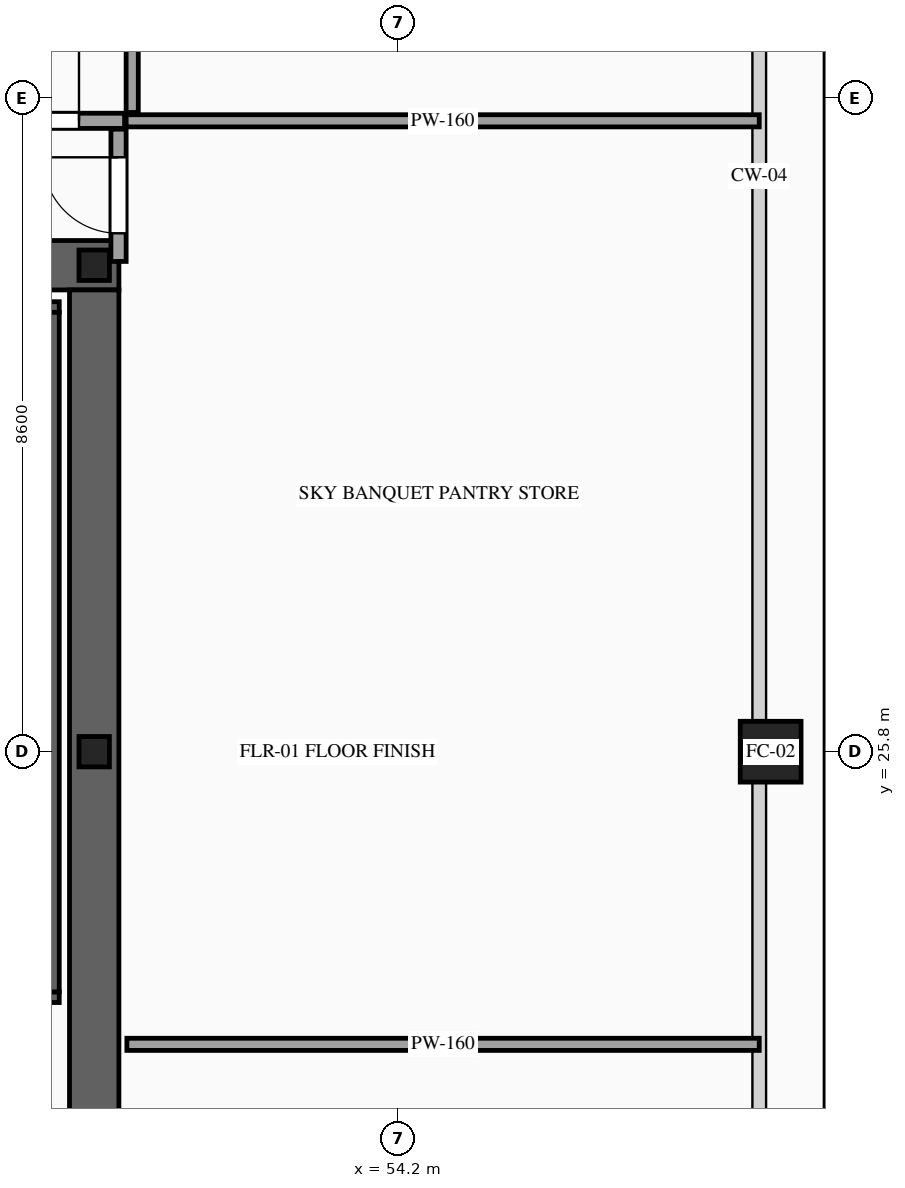
"""IFC4 building model, lengths in metres.
Left out: names, types, materials, properties, quantities, classifications, styles, units other than length and angle.
Written with IfcOpenShell. Run it as: python <this file> out.ifc"""

import sys

from ifc_helpers import new_model, si_unit, direction, frame, frame_2d, origin, origin_2d, place, context, subcontext, project, spatial, rectangle, hollow_rectangle, i_section, extrude, source, transform, mapped, element, fill, save


model = new_model("IFC4")
c1 = context("Model", 3, precision=1e-05, world=origin(), true_north=direction((0.0, 1.0)))
c2 = subcontext(c1, "Body", "Model", "MODEL_VIEW")
j1 = project(units=[si_unit("LENGTHUNIT", "METRE"), si_unit("PLANEANGLEUNIT", "RADIAN")], contexts=[c1])
p1 = place(None, origin())
s1 = spatial("IfcSite", under=j1, at=p1, CompositionType="ELEMENT")
p2 = place(p1, origin())
s2 = spatial("IfcBuilding", under=s1, at=p2, CompositionType="ELEMENT")
p3 = place(p2, frame((0.0, 0.0, 166.8)))
s3 = spatial("IfcBuildingStorey", under=s2, at=p3, CompositionType="ELEMENT", Elevation=166.8)
p4 = place(p3, frame((23.475, 32.2, 0.0), z_axis=(0.0, 0.0, 1.0), x_axis=(1.0, 0.0, 0.0)))
e1 = element("IfcWall", 1, at=p4, inside=s3, PredefinedType="SHEAR", context=c2, shape_type="SweptSolid", body=[
    extrude(rectangle(XDim=27.05, YDim=0.65, at=frame_2d((13.525, 0.0))), origin(), (0.0, 0.0, 1.0), 4.8),
])
p5 = place(p4, frame((4.595, 0.0, 0.0)))
e2 = element("IfcOpeningElement", 2, at=p5, cuts=e1, PredefinedType="OPENING", context=c2, shape_type="SweptSolid", body=[
    extrude(rectangle(XDim=0.9, YDim=2.15, at=frame_2d((0.45, 1.075))), frame((0.0, 0.34, 0.0), z_axis=(0.0, -1.0, 0.0), x_axis=(1.0, 0.0, 0.0)), (0.0, 0.0, 1.0), 0.68),
])
p6 = place(p4, frame((9.875, 0.0, 0.0)))
e3 = element("IfcOpeningElement", 3, at=p6, cuts=e1, PredefinedType="OPENING", context=c2, shape_type="SweptSolid", body=[
    extrude(rectangle(XDim=1.1, YDim=2.2, at=frame_2d((0.55, 1.1))), frame((0.0, 0.34, 0.0), z_axis=(0.0, -1.0, 0.0), x_axis=(1.0, 0.0, 0.0)), (0.0, 0.0, 1.0), 0.68),
])
p7 = place(p4, frame((15.725, 0.0, 0.0)))
e4 = element("IfcOpeningElement", 4, at=p7, cuts=e1, PredefinedType="OPENING", context=c2, shape_type="SweptSolid", body=[
    extrude(rectangle(XDim=1.1, YDim=2.2, at=frame_2d((0.55, 1.1))), frame((0.0, 0.34, 0.0), z_axis=(0.0, -1.0, 0.0), x_axis=(1.0, 0.0, 0.0)), (0.0, 0.0, 1.0), 0.68),
])
p8 = place(p4, frame((18.825, 0.0, 0.0)))
e5 = element("IfcOpeningElement", 5, at=p8, cuts=e1, PredefinedType="OPENING", context=c2, shape_type="SweptSolid", body=[
    extrude(rectangle(XDim=1.1, YDim=2.2, at=frame_2d((0.55, 1.1))), frame((0.0, 0.34, 0.0), z_axis=(0.0, -1.0, 0.0), x_axis=(1.0, 0.0, 0.0)), (0.0, 0.0, 1.0), 0.68),
])
m1 = source(origin(), c2, "Body", "SweptSolid", [
    extrude(rectangle(XDim=12.15, YDim=0.65, at=frame_2d((6.075, 0.0))), origin(), (0.0, 0.0, 1.0), 4.8),
])
p9 = place(p3, frame((50.2, 19.725, 0.0), z_axis=(0.0, 0.0, 1.0), x_axis=(0.0, 1.0, 0.0)))
e6 = element("IfcWall", 6, at=p9, inside=s3, PredefinedType="SHEAR", context=c2, shape_type="MappedRepresentation", body=[
    mapped(m1, transform((0.0, 0.0, 0.0), scale=1.0)),
])
m2 = source(origin(), c2, "Body", "SweptSolid", [
    extrude(i_section(OverallWidth=0.4, OverallDepth=0.4, WebThickness=0.013, FlangeThickness=0.021, at=origin_2d()), origin(), (0.0, 0.0, 1.0), 4.8),
])
for number, where, z_axis, x_axis in (
    (7, (50.2, 25.8, 0.0), (0.0, 0.0, 1.0), (1.0, 0.0, 0.0)),
    (8, (50.2, 32.2, 0.0), (0.0, 0.0, 1.0), (1.0, 0.0, 0.0)),
):
    element("IfcColumn", number, at=place(p3, frame(where, z_axis=z_axis, x_axis=x_axis)), inside=s3, PredefinedType="COLUMN", context=c2, shape_type="MappedRepresentation", body=[
        mapped(m2, transform((0.0, 0.0, 0.0), scale=1.0)),
    ])
m3 = source(origin(), c2, "Body", "SweptSolid", [
    extrude(hollow_rectangle(XDim=0.8, YDim=0.8, WallThickness=0.036, at=origin_2d()), origin(), (0.0, 0.0, 1.0), 4.8),
])
p10 = place(p3, frame((59.1, 25.8, 0.0), z_axis=(0.0, 0.0, 1.0), x_axis=(1.0, 0.0, 0.0)))
e9 = element("IfcColumn", 9, at=p10, inside=s3, PredefinedType="COLUMN", context=c2, shape_type="MappedRepresentation", body=[
    mapped(m3, transform((0.0, 0.0, 0.0), scale=1.0)),
])
p11 = place(p3, frame((46.46, 22.57, 0.0), z_axis=(0.0, 0.0, 1.0), x_axis=(1.0, 0.0, 0.0)))
e10 = element("IfcWall", 10, at=p11, inside=s3, PredefinedType="SOLIDWALL", context=c2, shape_type="SweptSolid", body=[
    extrude(rectangle(XDim=3.28, YDim=0.14, at=frame_2d((1.64, 0.0))), origin(), (0.0, 0.0, 1.0), 4.5),
])
p12 = place(p11, frame((1.09, 0.0, 0.0)))
e11 = element("IfcOpeningElement", 11, at=p12, cuts=e10, PredefinedType="OPENING", context=c2, shape_type="SweptSolid", body=[
    extrude(rectangle(XDim=1.1, YDim=2.2, at=frame_2d((0.55, 1.1))), frame((0.0, 0.085, 0.0), z_axis=(0.0, -1.0, 0.0), x_axis=(1.0, 0.0, 0.0)), (0.0, 0.0, 1.0), 0.17),
])
m4 = source(origin(), c2, "Body", "SweptSolid", [
    extrude(rectangle(XDim=3.28, YDim=0.14, at=frame_2d((1.64, 0.0))), origin(), (0.0, 0.0, 1.0), 4.5),
])
p13 = place(p3, frame((46.46, 31.65, 0.0), z_axis=(0.0, 0.0, 1.0), x_axis=(1.0, 0.0, 0.0)))
e12 = element("IfcWall", 12, at=p13, inside=s3, PredefinedType="SOLIDWALL", context=c2, shape_type="MappedRepresentation", body=[
    mapped(m4, transform((0.0, 0.0, 0.0), scale=1.0)),
])
m5 = source(origin(), c2, "Body", "SweptSolid", [
    extrude(rectangle(XDim=8.94, YDim=0.14, at=frame_2d((4.47, 0.0))), origin(), (0.0, 0.0, 1.0), 4.5),
])
p14 = place(p3, frame((49.67, 22.64, 0.0), z_axis=(0.0, 0.0, 1.0), x_axis=(0.0, 1.0, 0.0)))
e13 = element("IfcWall", 13, at=p14, inside=s3, PredefinedType="SOLIDWALL", context=c2, shape_type="MappedRepresentation", body=[
    mapped(m5, transform((0.0, 0.0, 0.0), scale=1.0)),
])
m6 = source(origin(), c2, "Body", "SweptSolid", [
    extrude(rectangle(XDim=8.32, YDim=0.16, at=frame_2d((4.16, 0.0))), origin(), (0.0, 0.0, 1.0), 4.5),
])
p15 = place(p3, frame((50.63, 21.95, 0.0), z_axis=(0.0, 0.0, 1.0), x_axis=(1.0, 0.0, 0.0)))
e14 = element("IfcWall", 14, at=p15, inside=s3, PredefinedType="PARTITIONING", context=c2, shape_type="MappedRepresentation", body=[
    mapped(m6, transform((0.0, 0.0, 0.0), scale=1.0)),
])
p16 = place(p3, frame((50.52, 32.25, 0.0), z_axis=(0.0, 0.0, 1.0), x_axis=(0.0, 1.0, 0.0)))
e15 = element("IfcWall", 15, at=p16, inside=s3, PredefinedType="PARTITIONING", context=c2, shape_type="SweptSolid", body=[
    extrude(rectangle(XDim=1.74, YDim=0.2, at=frame_2d((0.87, 0.0))), origin(), (0.0, 0.0, 1.0), 4.5),
])
p17 = place(p16, frame((0.37, 0.0, 0.0)))
e16 = element("IfcOpeningElement", 16, at=p17, cuts=e15, PredefinedType="OPENING", context=c2, shape_type="SweptSolid", body=[
    extrude(rectangle(XDim=1.0, YDim=2.2, at=frame_2d((0.5, 1.1))), frame((0.0, 0.115, 0.0), z_axis=(0.0, -1.0, 0.0), x_axis=(1.0, 0.0, 0.0)), (0.0, 0.0, 1.0), 0.23),
])
m7 = source(origin(), c2, "Body", "SweptSolid", [
    extrude(rectangle(XDim=8.33, YDim=0.16, at=frame_2d((4.165, 0.0))), origin(), (0.0, 0.0, 1.0), 4.5),
])
p18 = place(p3, frame((50.62, 34.1, 0.0), z_axis=(0.0, 0.0, 1.0), x_axis=(1.0, 0.0, 0.0)))
e17 = element("IfcWall", 17, at=p18, inside=s3, PredefinedType="PARTITIONING", context=c2, shape_type="MappedRepresentation", body=[
    mapped(m7, transform((0.0, 0.0, 0.0), scale=1.0)),
])
p19 = place(p3, frame((48.4, 34.1, 0.0), z_axis=(0.0, 0.0, 1.0), x_axis=(1.0, 0.0, 0.0)))
e18 = element("IfcWall", 18, at=p19, inside=s3, PredefinedType="PARTITIONING", context=c2, shape_type="SweptSolid", body=[
    extrude(rectangle(XDim=2.2, YDim=0.2, at=frame_2d((1.1, 0.0))), origin(), (0.0, 0.0, 1.0), 4.5),
])
p20 = place(p19, frame((0.6, 0.0, 0.0)))
e19 = element("IfcOpeningElement", 19, at=p20, cuts=e18, PredefinedType="OPENING", context=c2, shape_type="SweptSolid", body=[
    extrude(rectangle(XDim=1.0, YDim=2.2, at=frame_2d((0.5, 1.1))), frame((0.0, 0.115, 0.0), z_axis=(0.0, -1.0, 0.0), x_axis=(1.0, 0.0, 0.0)), (0.0, 0.0, 1.0), 0.23),
])
m8 = source(origin(), c2, "Body", "SweptSolid", [
    extrude(rectangle(XDim=13.54, YDim=0.16, at=frame_2d((6.77, 0.0))), origin(), (0.0, 0.0, 1.0), 4.5),
])
p21 = place(p3, frame((50.7, 34.21, 0.0), z_axis=(0.0, 0.0, 1.0), x_axis=(0.0, 1.0, 0.0)))
e20 = element("IfcWall", 20, at=p21, inside=s3, PredefinedType="PARTITIONING", context=c2, shape_type="MappedRepresentation", body=[
    mapped(m8, transform((0.0, 0.0, 0.0), scale=1.0)),
])
m9 = source(origin(), c2, "Body", "SweptSolid", [
    extrude(rectangle(XDim=1.0, YDim=2.2, at=frame_2d((0.5, 1.1))), frame((0.0, 0.025, 0.0), z_axis=(0.0, -1.0, 0.0), x_axis=(1.0, 0.0, 0.0)), (0.0, 0.0, 1.0), 0.05),
])
p22 = place(p17, origin())
e21 = element("IfcDoor", 21, at=p22, inside=s3, OperationType="SINGLE_SWING_RIGHT", PredefinedType="DOOR", context=c2, shape_type="MappedRepresentation", body=[
    mapped(m9, transform((0.0, 0.0, 0.0), scale=1.0)),
])
fill(e16, e21)
p23 = place(p20, origin())
e22 = element("IfcDoor", 22, at=p23, inside=s3, OperationType="SINGLE_SWING_RIGHT", PredefinedType="DOOR", context=c2, shape_type="MappedRepresentation", body=[
    mapped(m9, transform((0.0, 0.0, 0.0), scale=1.0)),
])
fill(e19, e22)
save(model, sys.argv[1])
